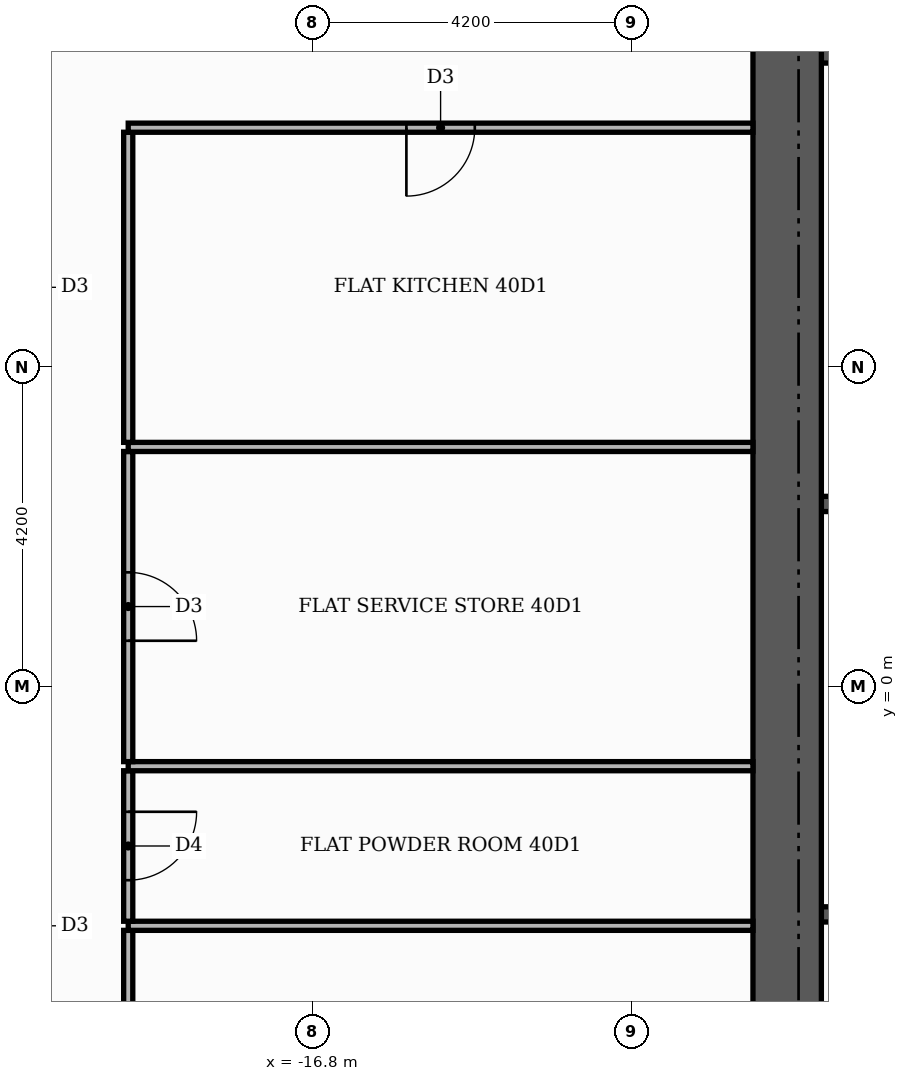
"""IFC4 building model, lengths in metres.
Left out: names, types, materials, properties, quantities, classifications, styles, units other than length and angle.
Written with IfcOpenShell. Run it as: python <this file> out.ifc"""

import sys

from ifc_helpers import new_model, si_unit, direction, frame, frame_2d, origin, place, context, subcontext, project, spatial, rectangle, extrude, element, fill, save


model = new_model("IFC4")
c1 = context("Model", 3, precision=1e-05, world=origin(), true_north=direction((0.0, 1.0)))
c2 = subcontext(c1, "Body", "Model", "MODEL_VIEW")
j1 = project(units=[si_unit("LENGTHUNIT", "METRE"), si_unit("PLANEANGLEUNIT", "RADIAN")], contexts=[c1])
p1 = place(None, origin())
s1 = spatial("IfcSite", under=j1, at=p1, CompositionType="ELEMENT")
p2 = place(p1, origin())
s2 = spatial("IfcBuilding", under=s1, at=p2, CompositionType="ELEMENT")
p3 = place(p2, frame((0.0, 0.0, 168.9)))
s3 = spatial("IfcBuildingStorey", under=s2, at=p3, CompositionType="ELEMENT", Elevation=168.9)
p4 = place(p3, frame((-10.1, 9.15, 0.0), z_axis=(0.0, 0.0, 1.0), x_axis=(1.0, 0.0, 0.0)))
e1 = element("IfcWall", 1, at=p4, inside=s3, PredefinedType="SHEAR", context=c2, shape_type="SweptSolid", body=[
    extrude(rectangle(XDim=4.6, YDim=1.9, at=frame_2d((2.3, 0.0))), origin(), (0.0, 0.0, 1.0), 3.48),
])
for number, where, z_axis, x_axis in (
    (2, (-10.1, -3.0, 0.0), (0.0, 0.0, 1.0), (1.0, 0.0, 0.0)),
    (3, (-10.1, 2.4, 0.0), (0.0, 0.0, 1.0), (1.0, 0.0, 0.0)),
):
    element("IfcWall", number, at=place(p3, frame(where, z_axis=z_axis, x_axis=x_axis)), inside=s3, PredefinedType="SHEAR", context=c2, shape_type="SweptSolid", body=[
        extrude(rectangle(XDim=0.9, YDim=0.2, at=frame_2d((0.45, 0.0))), origin(), (0.0, 0.0, 1.0), 3.48),
    ])
p5 = place(p3, frame((-10.55, -10.1, 0.0), z_axis=(0.0, 0.0, 1.0), x_axis=(0.0, 1.0, 0.0)))
e4 = element("IfcWall", 4, at=p5, inside=s3, PredefinedType="SHEAR", context=c2, shape_type="SweptSolid", body=[
    extrude(rectangle(XDim=20.2, YDim=0.9, at=frame_2d((10.1, 0.0))), origin(), (0.0, 0.0, 1.0), 3.48),
])
p6 = place(p3, frame((-19.22, -7.29, 0.0), z_axis=(0.0, 0.0, 1.0), x_axis=(0.0, 1.0, 0.0)))
e5 = element("IfcWall", 5, at=p6, inside=s3, PredefinedType="PARTITIONING", context=c2, shape_type="SweptSolid", body=[
    extrude(rectangle(XDim=4.08, YDim=0.12, at=frame_2d((2.04, 0.0))), origin(), (0.0, 0.0, 1.0), 3.48),
])
p7 = place(p6, frame((1.59, 0.0, 0.0)))
e6 = element("IfcOpeningElement", 6, at=p7, cuts=e5, PredefinedType="OPENING", context=c2, shape_type="SweptSolid", body=[
    extrude(rectangle(XDim=0.9, YDim=2.1, at=frame_2d((0.45, 1.05))), frame((0.0, 0.07, 0.0), z_axis=(0.0, -1.0, 0.0), x_axis=(1.0, 0.0, 0.0)), (0.0, 0.0, 1.0), 0.14),
])
p8 = place(p3, frame((-19.22, -3.15, 0.0), z_axis=(0.0, 0.0, 1.0), x_axis=(1.0, 0.0, 0.0)))
e7 = element("IfcWall", 7, at=p8, inside=s3, PredefinedType="PARTITIONING", context=c2, shape_type="SweptSolid", body=[
    extrude(rectangle(XDim=8.22, YDim=0.12, at=frame_2d((4.11, 0.0))), origin(), (0.0, 0.0, 1.0), 3.48),
])
p9 = place(p3, frame((-19.22, -3.09, 0.0), z_axis=(0.0, 0.0, 1.0), x_axis=(0.0, 1.0, 0.0)))
e8 = element("IfcWall", 8, at=p9, inside=s3, PredefinedType="PARTITIONING", context=c2, shape_type="SweptSolid", body=[
    extrude(rectangle(XDim=1.98, YDim=0.12, at=frame_2d((0.99, 0.0))), origin(), (0.0, 0.0, 1.0), 3.48),
])
p10 = place(p9, frame((0.54, 0.0, 0.0)))
e9 = element("IfcOpeningElement", 9, at=p10, cuts=e8, PredefinedType="OPENING", context=c2, shape_type="SweptSolid", body=[
    extrude(rectangle(XDim=0.9, YDim=2.1, at=frame_2d((0.45, 1.05))), frame((0.0, 0.07, 0.0), z_axis=(0.0, -1.0, 0.0), x_axis=(1.0, 0.0, 0.0)), (0.0, 0.0, 1.0), 0.14),
])
p11 = place(p3, frame((-19.22, -1.05, 0.0), z_axis=(0.0, 0.0, 1.0), x_axis=(1.0, 0.0, 0.0)))
e10 = element("IfcWall", 10, at=p11, inside=s3, PredefinedType="PARTITIONING", context=c2, shape_type="SweptSolid", body=[
    extrude(rectangle(XDim=8.22, YDim=0.12, at=frame_2d((4.11, 0.0))), origin(), (0.0, 0.0, 1.0), 3.48),
])
p12 = place(p3, frame((-19.22, -0.99, 0.0), z_axis=(0.0, 0.0, 1.0), x_axis=(0.0, 1.0, 0.0)))
e11 = element("IfcWall", 11, at=p12, inside=s3, PredefinedType="PARTITIONING", context=c2, shape_type="SweptSolid", body=[
    extrude(rectangle(XDim=4.08, YDim=0.12, at=frame_2d((2.04, 0.0))), origin(), (0.0, 0.0, 1.0), 3.48),
])
p13 = place(p12, frame((1.59, 0.0, 0.0)))
e12 = element("IfcOpeningElement", 12, at=p13, cuts=e11, PredefinedType="OPENING", context=c2, shape_type="SweptSolid", body=[
    extrude(rectangle(XDim=0.9, YDim=2.1, at=frame_2d((0.45, 1.05))), frame((0.0, 0.07, 0.0), z_axis=(0.0, -1.0, 0.0), x_axis=(1.0, 0.0, 0.0)), (0.0, 0.0, 1.0), 0.14),
])
p14 = place(p3, frame((-19.22, 3.15, 0.0), z_axis=(0.0, 0.0, 1.0), x_axis=(1.0, 0.0, 0.0)))
e13 = element("IfcWall", 13, at=p14, inside=s3, PredefinedType="PARTITIONING", context=c2, shape_type="SweptSolid", body=[
    extrude(rectangle(XDim=8.22, YDim=0.12, at=frame_2d((4.11, 0.0))), origin(), (0.0, 0.0, 1.0), 3.48),
])
p15 = place(p3, frame((-19.22, 3.21, 0.0), z_axis=(0.0, 0.0, 1.0), x_axis=(0.0, 1.0, 0.0)))
e14 = element("IfcWall", 14, at=p15, inside=s3, PredefinedType="PARTITIONING", context=c2, shape_type="SweptSolid", body=[
    extrude(rectangle(XDim=4.08, YDim=0.12, at=frame_2d((2.04, 0.0))), origin(), (0.0, 0.0, 1.0), 3.48),
])
p16 = place(p3, frame((-19.22, 7.35, 0.0), z_axis=(0.0, 0.0, 1.0), x_axis=(1.0, 0.0, 0.0)))
e15 = element("IfcWall", 15, at=p16, inside=s3, PredefinedType="PARTITIONING", context=c2, shape_type="SweptSolid", body=[
    extrude(rectangle(XDim=8.22, YDim=0.12, at=frame_2d((4.11, 0.0))), origin(), (0.0, 0.0, 1.0), 3.48),
])
p17 = place(p16, frame((3.66, 0.0, 0.0)))
e16 = element("IfcOpeningElement", 16, at=p17, cuts=e15, PredefinedType="OPENING", context=c2, shape_type="SweptSolid", body=[
    extrude(rectangle(XDim=0.9, YDim=2.1, at=frame_2d((0.45, 1.05))), frame((0.0, 0.07, 0.0), z_axis=(0.0, -1.0, 0.0), x_axis=(1.0, 0.0, 0.0)), (0.0, 0.0, 1.0), 0.14),
])
p18 = place(p17, frame((0.9, 0.0, 0.0), z_axis=(0.0, 0.0, 1.0), x_axis=(-1.0, 0.0, 0.0)))
e17 = element("IfcDoor", 17, at=p18, inside=s3, OperationType="SINGLE_SWING_LEFT", PredefinedType="DOOR", context=c2, shape_type="SweptSolid", body=[
    extrude(rectangle(XDim=0.9, YDim=2.1, at=frame_2d((0.45, 1.05))), frame((0.0, 0.025, 0.0), z_axis=(0.0, -1.0, 0.0), x_axis=(1.0, 0.0, 0.0)), (0.0, 0.0, 1.0), 0.05),
])
fill(e16, e17)
p19 = place(p13, frame((0.9, 0.0, 0.0), z_axis=(0.0, 0.0, 1.0), x_axis=(-1.0, 0.0, 0.0)))
e18 = element("IfcDoor", 18, at=p19, inside=s3, OperationType="SINGLE_SWING_LEFT", PredefinedType="DOOR", context=c2, shape_type="SweptSolid", body=[
    extrude(rectangle(XDim=0.9, YDim=2.1, at=frame_2d((0.45, 1.05))), frame((0.0, 0.025, 0.0), z_axis=(0.0, -1.0, 0.0), x_axis=(1.0, 0.0, 0.0)), (0.0, 0.0, 1.0), 0.05),
])
fill(e12, e18)
p20 = place(p10, frame((0.9, 0.0, 0.0), z_axis=(0.0, 0.0, 1.0), x_axis=(-1.0, 0.0, 0.0)))
e19 = element("IfcDoor", 19, at=p20, inside=s3, OperationType="SINGLE_SWING_RIGHT", PredefinedType="DOOR", context=c2, shape_type="SweptSolid", body=[
    extrude(rectangle(XDim=0.9, YDim=2.1, at=frame_2d((0.45, 1.05))), frame((0.0, 0.025, 0.0), z_axis=(0.0, -1.0, 0.0), x_axis=(1.0, 0.0, 0.0)), (0.0, 0.0, 1.0), 0.05),
])
fill(e9, e19)
save(model, sys.argv[1])
